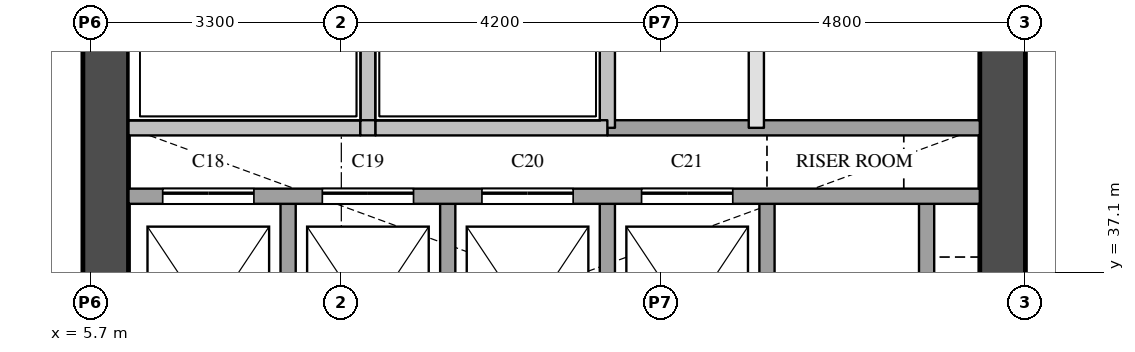
"""IFC4 building model, lengths in metres.
Left out: names, types, materials, properties, quantities, classifications, styles, units other than length and angle.
Written with IfcOpenShell. Run it as: python <this file> out.ifc"""

import sys

from ifc_helpers import new_model, si_unit, direction, frame, frame_2d, origin, place, context, subcontext, project, spatial, rectangle, extrude, element, fill, save


model = new_model("IFC4")
c1 = context("Model", 3, precision=1e-05, world=origin(), true_north=direction((0.0, 1.0)))
c2 = subcontext(c1, "Body", "Model", "MODEL_VIEW")
j1 = project(units=[si_unit("LENGTHUNIT", "METRE"), si_unit("PLANEANGLEUNIT", "RADIAN")], contexts=[c1])
p1 = place(None, origin())
s1 = spatial("IfcSite", under=j1, at=p1, CompositionType="ELEMENT")
p2 = place(p1, origin())
s2 = spatial("IfcBuilding", under=s1, at=p2, CompositionType="ELEMENT")
p3 = place(p2, frame((0.0, 0.0, 72.8)))
s3 = spatial("IfcBuildingStorey", under=s2, at=p3, CompositionType="ELEMENT", Elevation=72.8)
p4 = place(p3, frame((5.9, 29.1, 0.0), z_axis=(0.0, 0.0, 1.0), x_axis=(0.0, 1.0, 0.0)))
e1 = element("IfcWall", 1, at=p4, inside=s3, PredefinedType="SHEAR", context=c2, shape_type="SweptSolid", body=[
    extrude(rectangle(XDim=20.3, YDim=0.6, at=frame_2d((10.15, 0.0))), origin(), (0.0, 0.0, 1.0), 4.7),
])
p5 = place(p4, frame((3.6, 0.0, 0.0)))
e2 = element("IfcOpeningElement", 2, at=p5, cuts=e1, PredefinedType="OPENING", context=c2, shape_type="SweptSolid", body=[
    extrude(rectangle(XDim=1.8, YDim=2.1, at=frame_2d((0.9, 1.05))), frame((0.0, 0.31, 0.0), z_axis=(0.0, -1.0, 0.0), x_axis=(1.0, 0.0, 0.0)), (0.0, 0.0, 1.0), 0.62),
])
p6 = place(p4, frame((16.4, 0.0, 0.0)))
e3 = element("IfcOpeningElement", 3, at=p6, cuts=e1, PredefinedType="OPENING", context=c2, shape_type="SweptSolid", body=[
    extrude(rectangle(XDim=1.0, YDim=2.1, at=frame_2d((0.5, 1.05))), frame((0.0, 0.31, 0.0), z_axis=(0.0, -1.0, 0.0), x_axis=(1.0, 0.0, 0.0)), (0.0, 0.0, 1.0), 0.62),
])
p7 = place(p3, frame((17.7, 29.1, 0.0), z_axis=(0.0, 0.0, 1.0), x_axis=(0.0, 1.0, 0.0)))
e4 = element("IfcWall", 4, at=p7, inside=s3, PredefinedType="SHEAR", context=c2, shape_type="SweptSolid", body=[
    extrude(rectangle(XDim=20.3, YDim=0.6, at=frame_2d((10.15, 0.0))), origin(), (0.0, 0.0, 1.0), 4.7),
])
p8 = place(p7, frame((1.25, 0.0, 0.0)))
e5 = element("IfcOpeningElement", 5, at=p8, cuts=e4, PredefinedType="OPENING", context=c2, shape_type="SweptSolid", body=[
    extrude(rectangle(XDim=0.7, YDim=2.1, at=frame_2d((0.35, 1.05))), frame((0.0, 0.31, 0.0), z_axis=(0.0, -1.0, 0.0), x_axis=(1.0, 0.0, 0.0)), (0.0, 0.0, 1.0), 0.62),
])
p9 = place(p7, frame((7.05, 0.0, 0.0)))
e6 = element("IfcOpeningElement", 6, at=p9, cuts=e4, PredefinedType="OPENING", context=c2, shape_type="SweptSolid", body=[
    extrude(rectangle(XDim=0.7, YDim=2.1, at=frame_2d((0.35, 1.05))), frame((0.0, 0.31, 0.0), z_axis=(0.0, -1.0, 0.0), x_axis=(1.0, 0.0, 0.0)), (0.0, 0.0, 1.0), 0.62),
])
p10 = place(p3, frame((8.3, 34.9, 0.0), z_axis=(0.0, 0.0, 1.0), x_axis=(0.0, 1.0, 0.0)))
e7 = element("IfcWall", 7, at=p10, inside=s3, PredefinedType="SOLIDWALL", context=c2, shape_type="SweptSolid", body=[
    extrude(rectangle(XDim=3.2, YDim=0.2, at=frame_2d((1.6, 0.0))), origin(), (0.0, 0.0, 1.0), 4.7),
])
p11 = place(p3, frame((9.35, 39.0, 0.0), z_axis=(0.0, 0.0, 1.0), x_axis=(0.0, 1.0, 0.0)))
e8 = element("IfcWall", 8, at=p11, inside=s3, PredefinedType="SOLIDWALL", context=c2, shape_type="SweptSolid", body=[
    extrude(rectangle(XDim=2.39, YDim=0.2, at=frame_2d((1.195, 0.0))), origin(), (0.0, 0.0, 1.0), 4.7),
])
for number, where, z_axis, x_axis in (
    (9, (10.4, 34.9, 0.0), (0.0, 0.0, 1.0), (0.0, 1.0, 0.0)),
    (10, (12.5, 34.9, 0.0), (0.0, 0.0, 1.0), (0.0, 1.0, 0.0)),
):
    element("IfcWall", number, at=place(p3, frame(where, z_axis=z_axis, x_axis=x_axis)), inside=s3, PredefinedType="SOLIDWALL", context=c2, shape_type="SweptSolid", body=[
        extrude(rectangle(XDim=3.2, YDim=0.2, at=frame_2d((1.6, 0.0))), origin(), (0.0, 0.0, 1.0), 4.7),
    ])
p12 = place(p3, frame((12.5, 39.0, 0.0), z_axis=(0.0, 0.0, 1.0), x_axis=(0.0, 1.0, 0.0)))
e11 = element("IfcWall", 11, at=p12, inside=s3, PredefinedType="SOLIDWALL", context=c2, shape_type="SweptSolid", body=[
    extrude(rectangle(XDim=2.39, YDim=0.2, at=frame_2d((1.195, 0.0))), origin(), (0.0, 0.0, 1.0), 4.7),
])
p13 = place(p3, frame((14.46, 39.0, 0.0), z_axis=(0.0, 0.0, 1.0), x_axis=(0.0, 1.0, 0.0)))
e12 = element("IfcWall", 12, at=p13, inside=s3, PredefinedType="PARTITIONING", context=c2, shape_type="SweptSolid", body=[
    extrude(rectangle(XDim=6.2, YDim=0.2, at=frame_2d((3.1, 0.0))), origin(), (0.0, 0.0, 1.0), 4.7),
])
for number, where, z_axis, x_axis in (
    (13, (14.6, 34.9, 0.0), (0.0, 0.0, 1.0), (0.0, 1.0, 0.0)),
    (14, (16.7, 34.9, 0.0), (0.0, 0.0, 1.0), (0.0, 1.0, 0.0)),
):
    element("IfcWall", number, at=place(p3, frame(where, z_axis=z_axis, x_axis=x_axis)), inside=s3, PredefinedType="SOLIDWALL", context=c2, shape_type="SweptSolid", body=[
        extrude(rectangle(XDim=3.2, YDim=0.2, at=frame_2d((1.6, 0.0))), origin(), (0.0, 0.0, 1.0), 4.7),
    ])
p14 = place(p3, frame((6.2, 38.1, 0.0), z_axis=(0.0, 0.0, 1.0), x_axis=(1.0, 0.0, 0.0)))
e15 = element("IfcWall", 15, at=p14, inside=s3, PredefinedType="SOLIDWALL", context=c2, shape_type="SweptSolid", body=[
    extrude(rectangle(XDim=11.2, YDim=0.2, at=frame_2d((5.6, 0.0))), origin(), (0.0, 0.0, 1.0), 4.7),
])
p15 = place(p14, frame((0.45, 0.0, 0.0)))
e16 = element("IfcOpeningElement", 16, at=p15, cuts=e15, PredefinedType="OPENING", context=c2, shape_type="SweptSolid", body=[
    extrude(rectangle(XDim=1.2, YDim=2.1, at=frame_2d((0.6, 1.05))), frame((0.0, 0.11, 0.0), z_axis=(0.0, -1.0, 0.0), x_axis=(1.0, 0.0, 0.0)), (0.0, 0.0, 1.0), 0.22),
])
p16 = place(p14, frame((2.55, 0.0, 0.0)))
e17 = element("IfcOpeningElement", 17, at=p16, cuts=e15, PredefinedType="OPENING", context=c2, shape_type="SweptSolid", body=[
    extrude(rectangle(XDim=1.2, YDim=2.1, at=frame_2d((0.6, 1.05))), frame((0.0, 0.11, 0.0), z_axis=(0.0, -1.0, 0.0), x_axis=(1.0, 0.0, 0.0)), (0.0, 0.0, 1.0), 0.22),
])
p17 = place(p14, frame((4.65, 0.0, 0.0)))
e18 = element("IfcOpeningElement", 18, at=p17, cuts=e15, PredefinedType="OPENING", context=c2, shape_type="SweptSolid", body=[
    extrude(rectangle(XDim=1.2, YDim=2.1, at=frame_2d((0.6, 1.05))), frame((0.0, 0.11, 0.0), z_axis=(0.0, -1.0, 0.0), x_axis=(1.0, 0.0, 0.0)), (0.0, 0.0, 1.0), 0.22),
])
p18 = place(p14, frame((6.75, 0.0, 0.0)))
e19 = element("IfcOpeningElement", 19, at=p18, cuts=e15, PredefinedType="OPENING", context=c2, shape_type="SweptSolid", body=[
    extrude(rectangle(XDim=1.2, YDim=2.1, at=frame_2d((0.6, 1.05))), frame((0.0, 0.11, 0.0), z_axis=(0.0, -1.0, 0.0), x_axis=(1.0, 0.0, 0.0)), (0.0, 0.0, 1.0), 0.22),
])
p19 = place(p3, frame((12.5, 39.0, 0.0), z_axis=(0.0, 0.0, 1.0), x_axis=(1.0, 0.0, 0.0)))
e20 = element("IfcWall", 20, at=p19, inside=s3, PredefinedType="SOLIDWALL", context=c2, shape_type="SweptSolid", body=[
    extrude(rectangle(XDim=4.9, YDim=0.2, at=frame_2d((2.45, 0.0))), origin(), (0.0, 0.0, 1.0), 4.7),
])
p20 = place(p3, frame((6.2, 39.0, 0.0), z_axis=(0.0, 0.0, 1.0), x_axis=(1.0, 0.0, 0.0)))
e21 = element("IfcWall", 21, at=p20, inside=s3, PredefinedType="SOLIDWALL", context=c2, shape_type="SweptSolid", body=[
    extrude(rectangle(XDim=3.05, YDim=0.2, at=frame_2d((1.525, 0.0))), origin(), (0.0, 0.0, 1.0), 4.7),
])
p21 = place(p3, frame((9.25, 39.0, 0.0), z_axis=(0.0, 0.0, 1.0), x_axis=(1.0, 0.0, 0.0)))
e22 = element("IfcWall", 22, at=p21, inside=s3, PredefinedType="SOLIDWALL", context=c2, shape_type="SweptSolid", body=[
    extrude(rectangle(XDim=0.2, YDim=0.2, at=frame_2d((0.1, 0.0))), origin(), (0.0, 0.0, 1.0), 4.7),
])
p22 = place(p3, frame((9.45, 39.0, 0.0), z_axis=(0.0, 0.0, 1.0), x_axis=(1.0, 0.0, 0.0)))
e23 = element("IfcWall", 23, at=p22, inside=s3, PredefinedType="SOLIDWALL", context=c2, shape_type="SweptSolid", body=[
    extrude(rectangle(XDim=3.05, YDim=0.2, at=frame_2d((1.525, 0.0))), origin(), (0.0, 0.0, 1.0), 4.7),
])
p23 = place(p15, origin())
e24 = element("IfcDoor", 24, at=p23, inside=s3, OperationType="SLIDING_TO_LEFT", PredefinedType="DOOR", context=c2, shape_type="SweptSolid", body=[
    extrude(rectangle(XDim=1.2, YDim=2.1, at=frame_2d((0.6, 1.05))), frame((0.0, 0.025, 0.0), z_axis=(0.0, -1.0, 0.0), x_axis=(1.0, 0.0, 0.0)), (0.0, 0.0, 1.0), 0.05),
])
fill(e16, e24)
p24 = place(p16, origin())
e25 = element("IfcDoor", 25, at=p24, inside=s3, OperationType="SLIDING_TO_LEFT", PredefinedType="DOOR", context=c2, shape_type="SweptSolid", body=[
    extrude(rectangle(XDim=1.2, YDim=2.1, at=frame_2d((0.6, 1.05))), frame((0.0, 0.025, 0.0), z_axis=(0.0, -1.0, 0.0), x_axis=(1.0, 0.0, 0.0)), (0.0, 0.0, 1.0), 0.05),
])
fill(e17, e25)
p25 = place(p17, origin())
e26 = element("IfcDoor", 26, at=p25, inside=s3, OperationType="SLIDING_TO_LEFT", PredefinedType="DOOR", context=c2, shape_type="SweptSolid", body=[
    extrude(rectangle(XDim=1.2, YDim=2.1, at=frame_2d((0.6, 1.05))), frame((0.0, 0.025, 0.0), z_axis=(0.0, -1.0, 0.0), x_axis=(1.0, 0.0, 0.0)), (0.0, 0.0, 1.0), 0.05),
])
fill(e18, e26)
p26 = place(p18, origin())
e27 = element("IfcDoor", 27, at=p26, inside=s3, OperationType="SLIDING_TO_LEFT", PredefinedType="DOOR", context=c2, shape_type="SweptSolid", body=[
    extrude(rectangle(XDim=1.2, YDim=2.1, at=frame_2d((0.6, 1.05))), frame((0.0, 0.025, 0.0), z_axis=(0.0, -1.0, 0.0), x_axis=(1.0, 0.0, 0.0)), (0.0, 0.0, 1.0), 0.05),
])
fill(e19, e27)
save(model, sys.argv[1])
